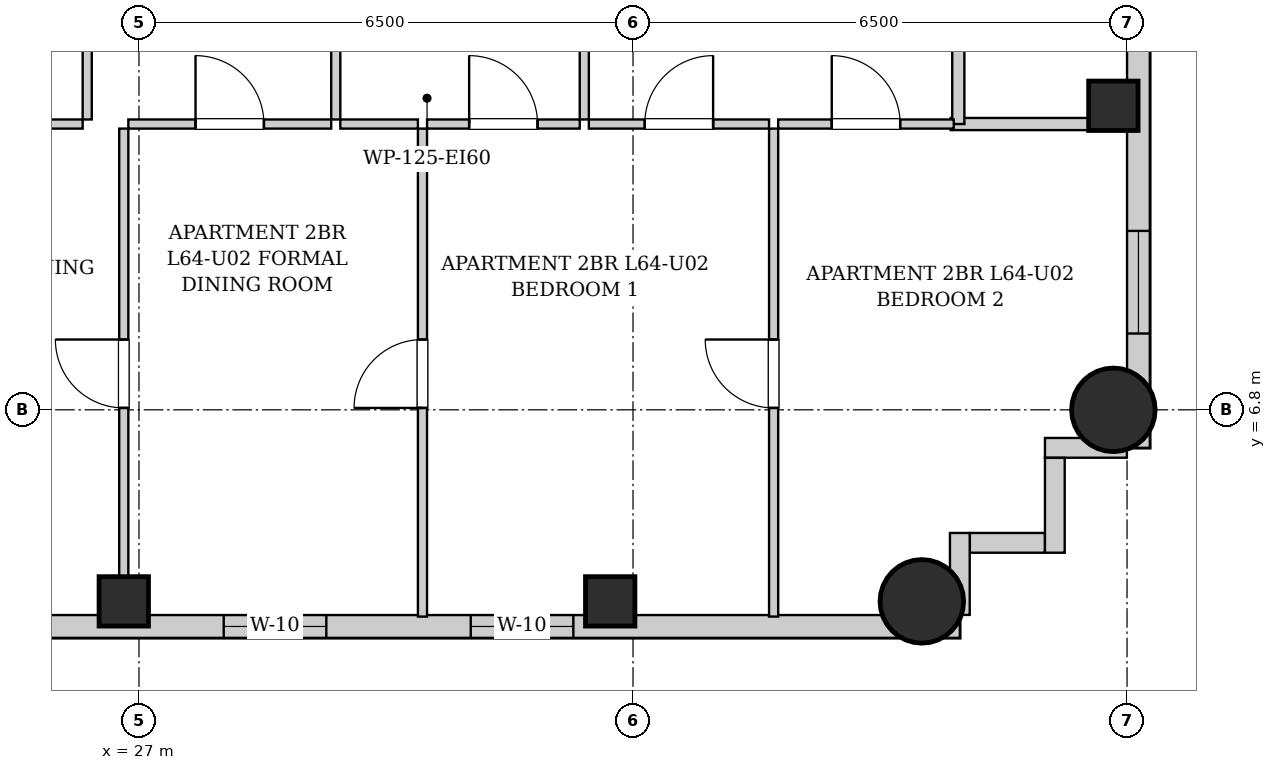
"""IFC4 building model, lengths in metres.
Left out: names, types, materials, properties, quantities, classifications, styles, units other than length and angle.
Written with IfcOpenShell. Run it as: python <this file> out.ifc"""

import sys

from ifc_helpers import new_model, si_unit, direction, frame, frame_2d, origin, origin_2d, place, context, subcontext, project, spatial, rectangle, circle, extrude, element, fill, save


model = new_model("IFC4")
c1 = context("Model", 3, precision=1e-05, world=origin(), true_north=direction((0.0, 1.0)))
c2 = subcontext(c1, "Body", "Model", "MODEL_VIEW")
j1 = project(units=[si_unit("LENGTHUNIT", "METRE"), si_unit("PLANEANGLEUNIT", "RADIAN")], contexts=[c1])
p1 = place(None, origin())
s1 = spatial("IfcSite", under=j1, at=p1, CompositionType="ELEMENT")
p2 = place(p1, origin())
s2 = spatial("IfcBuilding", under=s1, at=p2, CompositionType="ELEMENT")
p3 = place(p2, frame((0.0, 0.0, 220.7)))
s3 = spatial("IfcBuildingStorey", under=s2, at=p3, CompositionType="ELEMENT", Elevation=220.7)
for number, where, z_axis, x_axis in (
    (1, (26.8, 4.28, 0.0), (0.0, 0.0, 1.0), (1.0, 0.0, 0.0)),
    (2, (33.2, 4.28, 0.0), (0.0, 0.0, 1.0), (1.0, 0.0, 0.0)),
):
    element("IfcColumn", number, at=place(p3, frame(where, z_axis=z_axis, x_axis=x_axis)), inside=s3, PredefinedType="COLUMN", context=c2, shape_type="SweptSolid", body=[
        extrude(rectangle(XDim=0.65, YDim=0.65, at=origin_2d()), origin(), (0.0, 0.0, 1.0), 3.4),
    ])
for number, where, z_axis, x_axis in (
    (3, (37.3, 4.28, 0.0), (0.0, 0.0, 1.0), (1.0, 0.0, 0.0)),
    (4, (39.82, 6.8, 0.0), (0.0, 0.0, 1.0), (1.0, 0.0, 0.0)),
):
    element("IfcColumn", number, at=place(p3, frame(where, z_axis=z_axis, x_axis=x_axis)), inside=s3, PredefinedType="COLUMN", context=c2, shape_type="SweptSolid", body=[
        extrude(circle(Radius=0.55, at=origin_2d()), origin(), (0.0, 0.0, 1.0), 3.4),
    ])
p4 = place(p3, frame((39.82, 10.8, 0.0), z_axis=(0.0, 0.0, 1.0), x_axis=(1.0, 0.0, 0.0)))
e5 = element("IfcColumn", 5, at=p4, inside=s3, PredefinedType="COLUMN", context=c2, shape_type="SweptSolid", body=[
    extrude(rectangle(XDim=0.65, YDim=0.65, at=origin_2d()), origin(), (0.0, 0.0, 1.0), 3.4),
])
p5 = place(p3, frame((40.15, 37.7, 0.0), z_axis=(0.0, 0.0, 1.0), x_axis=(0.0, -1.0, 0.0)))
e6 = element("IfcWall", 6, at=p5, inside=s3, PredefinedType="SOLIDWALL", context=c2, shape_type="SweptSolid", body=[
    extrude(rectangle(XDim=31.4, YDim=0.3, at=frame_2d((15.7, 0.0))), origin(), (0.0, 0.0, 1.0), 3.14),
])
p6 = place(p5, frame((28.546, 0.0, 0.55)))
e7 = element("IfcOpeningElement", 7, at=p6, cuts=e6, PredefinedType="OPENING", context=c2, shape_type="SweptSolid", body=[
    extrude(rectangle(XDim=1.35, YDim=1.2, at=frame_2d((0.675, 0.6))), frame((0.0, 0.16, 0.0), z_axis=(0.0, -1.0, 0.0), x_axis=(1.0, 0.0, 0.0)), (0.0, 0.0, 1.0), 0.32),
])
p7 = place(p5, frame((1.504, 0.0, 0.55)))
e8 = element("IfcOpeningElement", 8, at=p7, cuts=e6, PredefinedType="OPENING", context=c2, shape_type="SweptSolid", body=[
    extrude(rectangle(XDim=1.35, YDim=1.2, at=frame_2d((0.675, 0.6))), frame((0.0, 0.16, 0.0), z_axis=(0.0, -1.0, 0.0), x_axis=(1.0, 0.0, 0.0)), (0.0, 0.0, 1.0), 0.32),
])
p8 = place(p5, frame((18.2, 0.0, 0.55)))
e9 = element("IfcOpeningElement", 9, at=p8, cuts=e6, PredefinedType="OPENING", context=c2, shape_type="SweptSolid", body=[
    extrude(rectangle(XDim=1.35, YDim=1.2, at=frame_2d((0.675, 0.6))), frame((0.0, 0.16, 0.0), z_axis=(0.0, -1.0, 0.0), x_axis=(1.0, 0.0, 0.0)), (0.0, 0.0, 1.0), 0.32),
])
p9 = place(p5, frame((19.81, 0.0, 0.55)))
e10 = element("IfcOpeningElement", 10, at=p9, cuts=e6, PredefinedType="OPENING", context=c2, shape_type="SweptSolid", body=[
    extrude(rectangle(XDim=1.35, YDim=1.2, at=frame_2d((0.675, 0.6))), frame((0.0, 0.16, 0.0), z_axis=(0.0, -1.0, 0.0), x_axis=(1.0, 0.0, 0.0)), (0.0, 0.0, 1.0), 0.32),
])
p10 = place(p5, frame((11.043, 0.0, 0.55)))
e11 = element("IfcOpeningElement", 11, at=p10, cuts=e6, PredefinedType="OPENING", context=c2, shape_type="SweptSolid", body=[
    extrude(rectangle(XDim=1.35, YDim=1.2, at=frame_2d((0.675, 0.6))), frame((0.0, 0.16, 0.0), z_axis=(0.0, -1.0, 0.0), x_axis=(1.0, 0.0, 0.0)), (0.0, 0.0, 1.0), 0.32),
])
p11 = place(p5, frame((9.185, 0.0, 0.55)))
e12 = element("IfcOpeningElement", 12, at=p11, cuts=e6, PredefinedType="OPENING", context=c2, shape_type="SweptSolid", body=[
    extrude(rectangle(XDim=1.35, YDim=1.2, at=frame_2d((0.675, 0.6))), frame((0.0, 0.16, 0.0), z_axis=(0.0, -1.0, 0.0), x_axis=(1.0, 0.0, 0.0)), (0.0, 0.0, 1.0), 0.32),
])
p12 = place(p3, frame((37.8, 3.95, 0.0), z_axis=(0.0, 0.0, 1.0), x_axis=(-1.0, 0.0, 0.0)))
e13 = element("IfcWall", 13, at=p12, inside=s3, PredefinedType="SOLIDWALL", context=c2, shape_type="SweptSolid", body=[
    extrude(rectangle(XDim=15.75, YDim=0.3, at=frame_2d((7.875, 0.0))), origin(), (0.0, 0.0, 1.0), 3.14),
])
p13 = place(p12, frame((8.335, 0.0, 0.55)))
e14 = element("IfcOpeningElement", 14, at=p13, cuts=e13, PredefinedType="OPENING", context=c2, shape_type="SweptSolid", body=[
    extrude(rectangle(XDim=1.35, YDim=1.2, at=frame_2d((0.675, 0.6))), frame((0.0, 0.16, 0.0), z_axis=(0.0, -1.0, 0.0), x_axis=(1.0, 0.0, 0.0)), (0.0, 0.0, 1.0), 0.32),
])
p14 = place(p12, frame((5.085, 0.0, 0.55)))
e15 = element("IfcOpeningElement", 15, at=p14, cuts=e13, PredefinedType="OPENING", context=c2, shape_type="SweptSolid", body=[
    extrude(rectangle(XDim=1.35, YDim=1.2, at=frame_2d((0.675, 0.6))), frame((0.0, 0.16, 0.0), z_axis=(0.0, -1.0, 0.0), x_axis=(1.0, 0.0, 0.0)), (0.0, 0.0, 1.0), 0.32),
])
p15 = place(p3, frame((39.998, 6.3, 0.0), z_axis=(0.0, 0.0, 1.0), x_axis=(-1.0, 0.0, 0.0)))
e16 = element("IfcWall", 16, at=p15, inside=s3, PredefinedType="SOLIDWALL", context=c2, shape_type="SweptSolid", body=[
    extrude(rectangle(XDim=1.078, YDim=0.26, at=frame_2d((0.539, 0.0))), origin(), (0.0, 0.0, 1.0), 3.14),
])
p16 = place(p3, frame((39.05, 6.168, 0.0), z_axis=(0.0, 0.0, 1.0), x_axis=(0.0, -1.0, 0.0)))
e17 = element("IfcWall", 17, at=p16, inside=s3, PredefinedType="SOLIDWALL", context=c2, shape_type="SweptSolid", body=[
    extrude(rectangle(XDim=1.248, YDim=0.26, at=frame_2d((0.624, 0.0))), origin(), (0.0, 0.0, 1.0), 3.14),
])
p17 = place(p3, frame((38.918, 5.05, 0.0), z_axis=(0.0, 0.0, 1.0), x_axis=(-1.0, 0.0, 0.0)))
e18 = element("IfcWall", 18, at=p17, inside=s3, PredefinedType="SOLIDWALL", context=c2, shape_type="SweptSolid", body=[
    extrude(rectangle(XDim=0.986, YDim=0.26, at=frame_2d((0.493, 0.0))), origin(), (0.0, 0.0, 1.0), 3.14),
])
p18 = place(p3, frame((37.8, 5.18, 0.0), z_axis=(0.0, 0.0, 1.0), x_axis=(0.0, -1.0, 0.0)))
e19 = element("IfcWall", 19, at=p18, inside=s3, PredefinedType="SOLIDWALL", context=c2, shape_type="SweptSolid", body=[
    extrude(rectangle(XDim=1.078, YDim=0.26, at=frame_2d((0.539, 0.0))), origin(), (0.0, 0.0, 1.0), 3.14),
])
p19 = place(p3, frame((37.68, 10.56, 0.0), z_axis=(0.0, 0.0, 1.0), x_axis=(1.0, 0.0, 0.0)))
e20 = element("IfcWall", 20, at=p19, inside=s3, PredefinedType="PARTITIONING", context=c2, shape_type="SweptSolid", body=[
    extrude(rectangle(XDim=2.34, YDim=0.16, at=frame_2d((1.17, 0.0))), origin(), (0.0, 0.0, 1.0), 3.14),
])
p20 = place(p3, frame((37.78, 10.56, 0.0), z_axis=(0.0, 0.0, 1.0), x_axis=(0.0, 1.0, 0.0)))
e21 = element("IfcWall", 21, at=p20, inside=s3, PredefinedType="PARTITIONING", context=c2, shape_type="SweptSolid", body=[
    extrude(rectangle(XDim=2.91, YDim=0.16, at=frame_2d((1.455, 0.0))), origin(), (0.0, 0.0, 1.0), 3.14),
])
p21 = place(p3, frame((26.319, 10.62, 0.0), z_axis=(0.0, 0.0, 1.0), x_axis=(0.0, 1.0, 0.0)))
e22 = element("IfcWall", 22, at=p21, inside=s3, PredefinedType="PARTITIONING", context=c2, shape_type="SweptSolid", body=[
    extrude(rectangle(XDim=2.85, YDim=0.12, at=frame_2d((1.425, 0.0))), origin(), (0.0, 0.0, 1.0), 3.14),
])
p22 = place(p21, frame((0.975, 0.0, 0.0)))
e23 = element("IfcOpeningElement", 23, at=p22, cuts=e22, PredefinedType="OPENING", context=c2, shape_type="SweptSolid", body=[
    extrude(rectangle(XDim=0.9, YDim=2.05, at=frame_2d((0.45, 1.025))), frame((0.0, 0.07, 0.0), z_axis=(0.0, -1.0, 0.0), x_axis=(1.0, 0.0, 0.0)), (0.0, 0.0, 1.0), 0.14),
])
p23 = place(p3, frame((21.819, 10.56, 0.0), z_axis=(0.0, 0.0, 1.0), x_axis=(1.0, 0.0, 0.0)))
e24 = element("IfcWall", 24, at=p23, inside=s3, PredefinedType="PARTITIONING", context=c2, shape_type="SweptSolid", body=[
    extrude(rectangle(XDim=4.44, YDim=0.12, at=frame_2d((2.22, 0.0))), origin(), (0.0, 0.0, 1.0), 3.14),
])
p24 = place(p23, frame((1.77, 0.0, 0.0)))
e25 = element("IfcOpeningElement", 25, at=p24, cuts=e24, PredefinedType="OPENING", context=c2, shape_type="SweptSolid", body=[
    extrude(rectangle(XDim=0.9, YDim=2.05, at=frame_2d((0.45, 1.025))), frame((0.0, 0.07, 0.0), z_axis=(0.0, -1.0, 0.0), x_axis=(1.0, 0.0, 0.0)), (0.0, 0.0, 1.0), 0.14),
])
p25 = place(p3, frame((29.589, 10.62, 0.0), z_axis=(0.0, 0.0, 1.0), x_axis=(0.0, 1.0, 0.0)))
e26 = element("IfcWall", 26, at=p25, inside=s3, PredefinedType="PARTITIONING", context=c2, shape_type="SweptSolid", body=[
    extrude(rectangle(XDim=2.85, YDim=0.12, at=frame_2d((1.425, 0.0))), origin(), (0.0, 0.0, 1.0), 3.14),
])
p26 = place(p25, frame((0.975, 0.0, 0.0)))
e27 = element("IfcOpeningElement", 27, at=p26, cuts=e26, PredefinedType="OPENING", context=c2, shape_type="SweptSolid", body=[
    extrude(rectangle(XDim=0.9, YDim=2.05, at=frame_2d((0.45, 1.025))), frame((0.0, 0.07, 0.0), z_axis=(0.0, -1.0, 0.0), x_axis=(1.0, 0.0, 0.0)), (0.0, 0.0, 1.0), 0.14),
])
p27 = place(p3, frame((26.86, 10.56, 0.0), z_axis=(0.0, 0.0, 1.0), x_axis=(1.0, 0.0, 0.0)))
e28 = element("IfcWall", 28, at=p27, inside=s3, PredefinedType="PARTITIONING", context=c2, shape_type="SweptSolid", body=[
    extrude(rectangle(XDim=2.669, YDim=0.12, at=frame_2d((1.334, 0.0))), origin(), (0.0, 0.0, 1.0), 3.14),
])
p28 = place(p27, frame((0.884, 0.0, 0.0)))
e29 = element("IfcOpeningElement", 29, at=p28, cuts=e28, PredefinedType="OPENING", context=c2, shape_type="SweptSolid", body=[
    extrude(rectangle(XDim=0.9, YDim=2.05, at=frame_2d((0.45, 1.025))), frame((0.0, 0.07, 0.0), z_axis=(0.0, -1.0, 0.0), x_axis=(1.0, 0.0, 0.0)), (0.0, 0.0, 1.0), 0.14),
])
p29 = place(p3, frame((32.859, 10.62, 0.0), z_axis=(0.0, 0.0, 1.0), x_axis=(0.0, 1.0, 0.0)))
e30 = element("IfcWall", 30, at=p29, inside=s3, PredefinedType="PARTITIONING", context=c2, shape_type="SweptSolid", body=[
    extrude(rectangle(XDim=2.85, YDim=0.12, at=frame_2d((1.425, 0.0))), origin(), (0.0, 0.0, 1.0), 3.14),
])
p30 = place(p29, frame((0.975, 0.0, 0.0)))
e31 = element("IfcOpeningElement", 31, at=p30, cuts=e30, PredefinedType="OPENING", context=c2, shape_type="SweptSolid", body=[
    extrude(rectangle(XDim=0.9, YDim=2.05, at=frame_2d((0.45, 1.025))), frame((0.0, 0.07, 0.0), z_axis=(0.0, -1.0, 0.0), x_axis=(1.0, 0.0, 0.0)), (0.0, 0.0, 1.0), 0.14),
])
p31 = place(p3, frame((29.649, 10.56, 0.0), z_axis=(0.0, 0.0, 1.0), x_axis=(1.0, 0.0, 0.0)))
e32 = element("IfcWall", 32, at=p31, inside=s3, PredefinedType="PARTITIONING", context=c2, shape_type="SweptSolid", body=[
    extrude(rectangle(XDim=1.021, YDim=0.12, at=frame_2d((0.51, 0.0))), origin(), (0.0, 0.0, 1.0), 3.14),
])
p32 = place(p3, frame((30.79, 10.56, 0.0), z_axis=(0.0, 0.0, 1.0), x_axis=(1.0, 0.0, 0.0)))
e33 = element("IfcWall", 33, at=p32, inside=s3, PredefinedType="PARTITIONING", context=c2, shape_type="SweptSolid", body=[
    extrude(rectangle(XDim=2.009, YDim=0.12, at=frame_2d((1.004, 0.0))), origin(), (0.0, 0.0, 1.0), 3.14),
])
p33 = place(p32, frame((0.554, 0.0, 0.0)))
e34 = element("IfcOpeningElement", 34, at=p33, cuts=e33, PredefinedType="OPENING", context=c2, shape_type="SweptSolid", body=[
    extrude(rectangle(XDim=0.9, YDim=2.05, at=frame_2d((0.45, 1.025))), frame((0.0, 0.07, 0.0), z_axis=(0.0, -1.0, 0.0), x_axis=(1.0, 0.0, 0.0)), (0.0, 0.0, 1.0), 0.14),
])
p34 = place(p3, frame((32.919, 10.56, 0.0), z_axis=(0.0, 0.0, 1.0), x_axis=(1.0, 0.0, 0.0)))
e35 = element("IfcWall", 35, at=p34, inside=s3, PredefinedType="PARTITIONING", context=c2, shape_type="SweptSolid", body=[
    extrude(rectangle(XDim=2.371, YDim=0.12, at=frame_2d((1.186, 0.0))), origin(), (0.0, 0.0, 1.0), 3.14),
])
p35 = place(p34, frame((0.735, 0.0, 0.0)))
e36 = element("IfcOpeningElement", 36, at=p35, cuts=e35, PredefinedType="OPENING", context=c2, shape_type="SweptSolid", body=[
    extrude(rectangle(XDim=0.9, YDim=2.05, at=frame_2d((0.45, 1.025))), frame((0.0, 0.07, 0.0), z_axis=(0.0, -1.0, 0.0), x_axis=(1.0, 0.0, 0.0)), (0.0, 0.0, 1.0), 0.14),
])
p36 = place(p3, frame((35.41, 10.56, 0.0), z_axis=(0.0, 0.0, 1.0), x_axis=(1.0, 0.0, 0.0)))
e37 = element("IfcWall", 37, at=p36, inside=s3, PredefinedType="PARTITIONING", context=c2, shape_type="SweptSolid", body=[
    extrude(rectangle(XDim=2.31, YDim=0.12, at=frame_2d((1.155, 0.0))), origin(), (0.0, 0.0, 1.0), 3.14),
])
p37 = place(p36, frame((0.705, 0.0, 0.0)))
e38 = element("IfcOpeningElement", 38, at=p37, cuts=e37, PredefinedType="OPENING", context=c2, shape_type="SweptSolid", body=[
    extrude(rectangle(XDim=0.9, YDim=2.05, at=frame_2d((0.45, 1.025))), frame((0.0, 0.07, 0.0), z_axis=(0.0, -1.0, 0.0), x_axis=(1.0, 0.0, 0.0)), (0.0, 0.0, 1.0), 0.14),
])
p38 = place(p3, frame((26.8, 4.08, 0.0), z_axis=(0.0, 0.0, 1.0), x_axis=(0.0, 1.0, 0.0)))
e39 = element("IfcWall", 39, at=p38, inside=s3, PredefinedType="PARTITIONING", context=c2, shape_type="SweptSolid", body=[
    extrude(rectangle(XDim=6.42, YDim=0.12, at=frame_2d((3.21, 0.0))), origin(), (0.0, 0.0, 1.0), 3.14),
])
p39 = place(p38, frame((2.745, 0.0, 0.0)))
e40 = element("IfcOpeningElement", 40, at=p39, cuts=e39, PredefinedType="OPENING", context=c2, shape_type="SweptSolid", body=[
    extrude(rectangle(XDim=0.9, YDim=2.05, at=frame_2d((0.45, 1.025))), frame((0.0, 0.07, 0.0), z_axis=(0.0, -1.0, 0.0), x_axis=(1.0, 0.0, 0.0)), (0.0, 0.0, 1.0), 0.14),
])
p40 = place(p3, frame((30.73, 4.08, 0.0), z_axis=(0.0, 0.0, 1.0), x_axis=(0.0, 1.0, 0.0)))
e41 = element("IfcWall", 41, at=p40, inside=s3, PredefinedType="PARTITIONING", context=c2, shape_type="SweptSolid", body=[
    extrude(rectangle(XDim=6.42, YDim=0.12, at=frame_2d((3.21, 0.0))), origin(), (0.0, 0.0, 1.0), 3.14),
])
p41 = place(p40, frame((2.745, 0.0, 0.0)))
e42 = element("IfcOpeningElement", 42, at=p41, cuts=e41, PredefinedType="OPENING", context=c2, shape_type="SweptSolid", body=[
    extrude(rectangle(XDim=0.9, YDim=2.05, at=frame_2d((0.45, 1.025))), frame((0.0, 0.07, 0.0), z_axis=(0.0, -1.0, 0.0), x_axis=(1.0, 0.0, 0.0)), (0.0, 0.0, 1.0), 0.14),
])
p42 = place(p3, frame((35.35, 4.08, 0.0), z_axis=(0.0, 0.0, 1.0), x_axis=(0.0, 1.0, 0.0)))
e43 = element("IfcWall", 43, at=p42, inside=s3, PredefinedType="PARTITIONING", context=c2, shape_type="SweptSolid", body=[
    extrude(rectangle(XDim=6.42, YDim=0.12, at=frame_2d((3.21, 0.0))), origin(), (0.0, 0.0, 1.0), 3.14),
])
p43 = place(p42, frame((2.745, 0.0, 0.0)))
e44 = element("IfcOpeningElement", 44, at=p43, cuts=e43, PredefinedType="OPENING", context=c2, shape_type="SweptSolid", body=[
    extrude(rectangle(XDim=0.9, YDim=2.05, at=frame_2d((0.45, 1.025))), frame((0.0, 0.07, 0.0), z_axis=(0.0, -1.0, 0.0), x_axis=(1.0, 0.0, 0.0)), (0.0, 0.0, 1.0), 0.14),
])
p44 = place(p28, origin())
e45 = element("IfcDoor", 45, at=p44, inside=s3, OperationType="SINGLE_SWING_LEFT", PredefinedType="DOOR", context=c2, shape_type="SweptSolid", body=[
    extrude(rectangle(XDim=0.9, YDim=2.05, at=frame_2d((0.45, 1.025))), frame((0.0, 0.025, 0.0), z_axis=(0.0, -1.0, 0.0), x_axis=(1.0, 0.0, 0.0)), (0.0, 0.0, 1.0), 0.05),
])
fill(e29, e45)
p45 = place(p33, origin())
e46 = element("IfcDoor", 46, at=p45, inside=s3, OperationType="SINGLE_SWING_LEFT", PredefinedType="DOOR", context=c2, shape_type="SweptSolid", body=[
    extrude(rectangle(XDim=0.9, YDim=2.05, at=frame_2d((0.45, 1.025))), frame((0.0, 0.025, 0.0), z_axis=(0.0, -1.0, 0.0), x_axis=(1.0, 0.0, 0.0)), (0.0, 0.0, 1.0), 0.05),
])
fill(e34, e46)
p46 = place(p35, origin())
e47 = element("IfcDoor", 47, at=p46, inside=s3, OperationType="SINGLE_SWING_RIGHT", PredefinedType="DOOR", context=c2, shape_type="SweptSolid", body=[
    extrude(rectangle(XDim=0.9, YDim=2.05, at=frame_2d((0.45, 1.025))), frame((0.0, 0.025, 0.0), z_axis=(0.0, -1.0, 0.0), x_axis=(1.0, 0.0, 0.0)), (0.0, 0.0, 1.0), 0.05),
])
fill(e36, e47)
p47 = place(p37, origin())
e48 = element("IfcDoor", 48, at=p47, inside=s3, OperationType="SINGLE_SWING_LEFT", PredefinedType="DOOR", context=c2, shape_type="SweptSolid", body=[
    extrude(rectangle(XDim=0.9, YDim=2.05, at=frame_2d((0.45, 1.025))), frame((0.0, 0.025, 0.0), z_axis=(0.0, -1.0, 0.0), x_axis=(1.0, 0.0, 0.0)), (0.0, 0.0, 1.0), 0.05),
])
fill(e38, e48)
p48 = place(p39, origin())
e49 = element("IfcDoor", 49, at=p48, inside=s3, OperationType="SINGLE_SWING_RIGHT", PredefinedType="DOOR", context=c2, shape_type="SweptSolid", body=[
    extrude(rectangle(XDim=0.9, YDim=2.05, at=frame_2d((0.45, 1.025))), frame((0.0, 0.025, 0.0), z_axis=(0.0, -1.0, 0.0), x_axis=(1.0, 0.0, 0.0)), (0.0, 0.0, 1.0), 0.05),
])
fill(e40, e49)
p49 = place(p41, origin())
e50 = element("IfcDoor", 50, at=p49, inside=s3, OperationType="SINGLE_SWING_LEFT", PredefinedType="DOOR", context=c2, shape_type="SweptSolid", body=[
    extrude(rectangle(XDim=0.9, YDim=2.05, at=frame_2d((0.45, 1.025))), frame((0.0, 0.025, 0.0), z_axis=(0.0, -1.0, 0.0), x_axis=(1.0, 0.0, 0.0)), (0.0, 0.0, 1.0), 0.05),
])
fill(e42, e50)
p50 = place(p43, origin())
e51 = element("IfcDoor", 51, at=p50, inside=s3, OperationType="SINGLE_SWING_RIGHT", PredefinedType="DOOR", context=c2, shape_type="SweptSolid", body=[
    extrude(rectangle(XDim=0.9, YDim=2.05, at=frame_2d((0.45, 1.025))), frame((0.0, 0.025, 0.0), z_axis=(0.0, -1.0, 0.0), x_axis=(1.0, 0.0, 0.0)), (0.0, 0.0, 1.0), 0.05),
])
fill(e44, e51)
p51 = place(p13, origin())
e52 = element("IfcWindow", 52, at=p51, inside=s3, PartitioningType="SINGLE_PANEL", PredefinedType="WINDOW", context=c2, shape_type="SweptSolid", body=[
    extrude(rectangle(XDim=1.35, YDim=1.2, at=frame_2d((0.675, 0.6))), frame((0.0, 0.03, 0.0), z_axis=(0.0, -1.0, 0.0), x_axis=(1.0, 0.0, 0.0)), (0.0, 0.0, 1.0), 0.06),
])
fill(e14, e52)
p52 = place(p14, origin())
e53 = element("IfcWindow", 53, at=p52, inside=s3, PartitioningType="SINGLE_PANEL", PredefinedType="WINDOW", context=c2, shape_type="SweptSolid", body=[
    extrude(rectangle(XDim=1.35, YDim=1.2, at=frame_2d((0.675, 0.6))), frame((0.0, 0.03, 0.0), z_axis=(0.0, -1.0, 0.0), x_axis=(1.0, 0.0, 0.0)), (0.0, 0.0, 1.0), 0.06),
])
fill(e15, e53)
p53 = place(p6, origin())
e54 = element("IfcWindow", 54, at=p53, inside=s3, PartitioningType="SINGLE_PANEL", PredefinedType="WINDOW", context=c2, shape_type="SweptSolid", body=[
    extrude(rectangle(XDim=1.35, YDim=1.2, at=frame_2d((0.675, 0.6))), frame((0.0, 0.03, 0.0), z_axis=(0.0, -1.0, 0.0), x_axis=(1.0, 0.0, 0.0)), (0.0, 0.0, 1.0), 0.06),
])
fill(e7, e54)
save(model, sys.argv[1])
